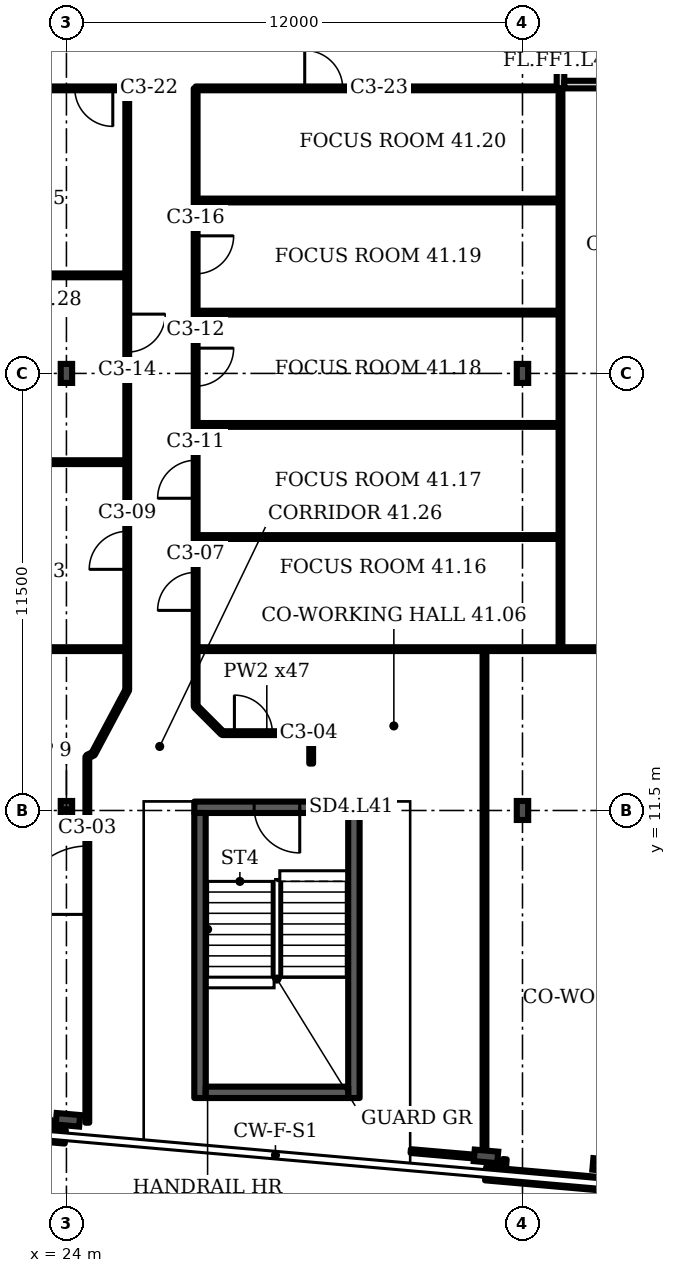
"""IFC4 building model, lengths in metres.
Left out: names, types, materials, properties, quantities, classifications, styles, units other than length and angle.
Written with IfcOpenShell. Run it as: python <this file> out.ifc"""

import sys

from ifc_helpers import new_model, si_unit, direction, frame, frame_2d, origin, origin_2d, place, context, subcontext, project, spatial, rectangle, i_section, extrude, element, fill, save


model = new_model("IFC4")
c1 = context("Model", 3, precision=1e-05, world=origin(), true_north=direction((0.0, 1.0)))
c2 = subcontext(c1, "Body", "Model", "MODEL_VIEW")
j1 = project(units=[si_unit("LENGTHUNIT", "METRE"), si_unit("PLANEANGLEUNIT", "RADIAN")], contexts=[c1])
p1 = place(None, origin())
s1 = spatial("IfcSite", under=j1, at=p1, CompositionType="ELEMENT")
p2 = place(p1, origin())
s2 = spatial("IfcBuilding", under=s1, at=p2, CompositionType="ELEMENT")
p3 = place(p2, frame((0.0, 0.0, 169.9)))
s3 = spatial("IfcBuildingStorey", under=s2, at=p3, CompositionType="ELEMENT", Elevation=169.9)
for number, where, z_axis, x_axis in (
    (1, (24.039, 3.361, 0.0), (0.0, 0.0, 1.0), (-0.087, -0.996, 0.0)),
    (2, (35.039, 2.399, 0.0), (0.0, 0.0, 1.0), (-0.087, -0.996, 0.0)),
    (3, (38.161, 2.174, 0.0), (0.0, 0.0, 1.0), (-0.087, -0.996, 0.0)),
):
    element("IfcColumn", number, at=place(p3, frame(where, z_axis=z_axis, x_axis=x_axis)), inside=s3, PredefinedType="COLUMN", context=c2, shape_type="SweptSolid", body=[
        extrude(i_section(OverallWidth=0.305, OverallDepth=0.62, WebThickness=0.021, FlangeThickness=0.04, FilletRadius=0.027, at=origin_2d()), origin(), (0.0, 0.0, 1.0), 3.6),
    ])
for number, where, z_axis, x_axis in (
    (4, (24.0, 11.5, 0.0), (0.0, 0.0, 1.0), (1.0, 0.0, 0.0)),
    (5, (36.0, 11.5, 0.0), (0.0, 0.0, 1.0), (1.0, 0.0, 0.0)),
    (6, (24.0, 23.0, 0.0), (0.0, 0.0, 1.0), (1.0, 0.0, 0.0)),
    (7, (36.0, 23.0, 0.0), (0.0, 0.0, 1.0), (1.0, 0.0, 0.0)),
):
    element("IfcColumn", number, at=place(p3, frame(where, z_axis=z_axis, x_axis=x_axis)), inside=s3, PredefinedType="COLUMN", context=c2, shape_type="SweptSolid", body=[
        extrude(i_section(OverallWidth=0.3, OverallDepth=0.5, WebThickness=0.014, FlangeThickness=0.028, FilletRadius=0.027, at=origin_2d()), origin(), (0.0, 0.0, 1.0), 3.6),
    ])
p4 = place(p3, frame((12.835, 3.885, 0.0), z_axis=(0.0, 0.0, 1.0), x_axis=(0.996199, -0.087154, 0.0)))
e8 = element("IfcWall", 8, at=p4, inside=s3, PredefinedType="SOLIDWALL", context=c2, shape_type="SweptSolid", body=[
    extrude(rectangle(XDim=11.177, YDim=0.35, at=frame_2d((5.588, 0.0))), origin(), (0.0, 0.0, 1.0), 1.0),
])
p5 = place(p3, frame((35.03, 1.943, 0.0), z_axis=(0.0, 0.0, 1.0), x_axis=(0.996199, -0.08714, 0.0)))
e9 = element("IfcWall", 9, at=p5, inside=s3, PredefinedType="SOLIDWALL", context=c2, shape_type="SweptSolid", body=[
    extrude(rectangle(XDim=11.028, YDim=0.35, at=frame_2d((5.514, 0.0))), origin(), (0.0, 0.0, 1.0), 1.0),
])
p6 = place(p3, frame((37.0, 30.5, 0.0), z_axis=(0.0, 0.0, 1.0), x_axis=(0.0, 1.0, 0.0)))
e10 = element("IfcWall", 10, at=p6, inside=s3, PredefinedType="PARTITIONING", context=c2, shape_type="SweptSolid", body=[
    extrude(rectangle(XDim=3.5, YDim=0.2, at=frame_2d((1.75, 0.0))), origin(), (0.0, 0.0, 1.0), 3.2),
])
p7 = place(p6, frame((1.2, 0.0, 0.0)))
e11 = element("IfcOpeningElement", 11, at=p7, cuts=e10, PredefinedType="OPENING", context=c2, shape_type="SweptSolid", body=[
    extrude(rectangle(XDim=1.1, YDim=2.1, at=frame_2d((0.55, 1.05))), frame((0.0, 0.11, 0.0), z_axis=(0.0, -1.0, 0.0), x_axis=(1.0, 0.0, 0.0)), (0.0, 0.0, 1.0), 0.22),
])
p8 = place(p3, frame((37.1, 30.6, 0.0), z_axis=(0.0, 0.0, 1.0), x_axis=(1.0, 0.0, 0.0)))
e12 = element("IfcWall", 12, at=p8, inside=s3, PredefinedType="PARTITIONING", context=c2, shape_type="SweptSolid", body=[
    extrude(rectangle(XDim=2.8, YDim=0.2, at=frame_2d((1.4, 0.0))), origin(), (0.0, 0.0, 1.0), 3.2),
])
p9 = place(p3, frame((27.364, 11.584, 0.0), z_axis=(0.0, 0.0, 1.0), x_axis=(1.0, 0.0, 0.0)))
e13 = element("IfcWall", 13, at=p9, inside=s3, PredefinedType="SHEAR", context=c2, shape_type="SweptSolid", body=[
    extrude(rectangle(XDim=4.35, YDim=0.3, at=frame_2d((2.175, 0.0))), origin(), (0.0, 0.0, 1.0), 3.2),
])
p10 = place(p9, frame((1.575, 0.0, 0.0)))
e14 = element("IfcOpeningElement", 14, at=p10, cuts=e13, PredefinedType="OPENING", context=c2, shape_type="SweptSolid", body=[
    extrude(rectangle(XDim=1.2, YDim=2.1, at=frame_2d((0.6, 1.05))), frame((0.0, 0.16, 0.0), z_axis=(0.0, -1.0, 0.0), x_axis=(1.0, 0.0, 0.0)), (0.0, 0.0, 1.0), 0.32),
])
p11 = place(p3, frame((13.0, 15.745, 0.0), z_axis=(0.0, 0.0, 1.0), x_axis=(1.0, 0.0, 0.0)))
e15 = element("IfcWall", 15, at=p11, inside=s3, PredefinedType="PARTITIONING", context=c2, shape_type="SweptSolid", body=[
    extrude(rectangle(XDim=12.6, YDim=0.1, at=frame_2d((6.3, 0.0))), origin(), (0.0, 0.0, 1.0), 3.2),
])
p12 = place(p3, frame((17.8, 30.5, 0.0), z_axis=(0.0, 0.0, 1.0), x_axis=(1.0, 0.0, 0.0)))
e16 = element("IfcWall", 16, at=p12, inside=s3, PredefinedType="PARTITIONING", context=c2, shape_type="SweptSolid", body=[
    extrude(rectangle(XDim=7.8, YDim=0.1, at=frame_2d((3.9, 0.0))), origin(), (0.0, 0.0, 1.0), 3.2),
])
p13 = place(p12, frame((6.42, 0.0, 0.0)))
e17 = element("IfcOpeningElement", 17, at=p13, cuts=e16, PredefinedType="OPENING", context=c2, shape_type="SweptSolid", body=[
    extrude(rectangle(XDim=1.0, YDim=2.1, at=frame_2d((0.5, 1.05))), frame((0.0, 0.06, 0.0), z_axis=(0.0, -1.0, 0.0), x_axis=(1.0, 0.0, 0.0)), (0.0, 0.0, 1.0), 0.12),
])
for number, where, z_axis, x_axis in (
    (18, (19.0, 20.665, 0.0), (0.0, 0.0, 1.0), (1.0, 0.0, 0.0)),
    (19, (19.0, 25.58, 0.0), (0.0, 0.0, 1.0), (1.0, 0.0, 0.0)),
):
    element("IfcWall", number, at=place(p3, frame(where, z_axis=z_axis, x_axis=x_axis)), inside=s3, PredefinedType="PARTITIONING", context=c2, shape_type="SweptSolid", body=[
        extrude(rectangle(XDim=6.6, YDim=0.1, at=frame_2d((3.3, 0.0))), origin(), (0.0, 0.0, 1.0), 3.2),
    ])
p14 = place(p3, frame((24.55, 12.915, 0.0), z_axis=(0.0, 0.0, 1.0), x_axis=(0.900306, 0.435266, 0.0)))
e20 = element("IfcWall", 20, at=p14, inside=s3, PredefinedType="PARTITIONING", context=c2, shape_type="SweptSolid", body=[
    extrude(rectangle(XDim=0.172, YDim=0.1, at=frame_2d((0.086, 0.0))), origin(), (0.0, 0.0, 1.0), 3.2),
])
p15 = place(p3, frame((24.55, 3.285, 0.0), z_axis=(0.0, 0.0, 1.0), x_axis=(0.0, 1.0, 0.0)))
e21 = element("IfcWall", 21, at=p15, inside=s3, PredefinedType="PARTITIONING", context=c2, shape_type="SweptSolid", body=[
    extrude(rectangle(XDim=9.63, YDim=0.1, at=frame_2d((4.815, 0.0))), origin(), (0.0, 0.0, 1.0), 3.2),
])
p16 = place(p15, frame((5.481, 0.0, 0.0)))
e22 = element("IfcOpeningElement", 22, at=p16, cuts=e21, PredefinedType="OPENING", context=c2, shape_type="SweptSolid", body=[
    extrude(rectangle(XDim=1.8, YDim=2.1, at=frame_2d((0.9, 1.05))), frame((0.0, 0.06, 0.0), z_axis=(0.0, -1.0, 0.0), x_axis=(1.0, 0.0, 0.0)), (0.0, 0.0, 1.0), 0.12),
])
p17 = place(p3, frame((24.705, 12.99, 0.0), z_axis=(0.0, 0.0, 1.0), x_axis=(0.4702, 0.882555, 0.0)))
e23 = element("IfcWall", 23, at=p17, inside=s3, PredefinedType="PARTITIONING", context=c2, shape_type="SweptSolid", body=[
    extrude(rectangle(XDim=1.904, YDim=0.1, at=frame_2d((0.952, 0.0))), origin(), (0.0, 0.0, 1.0), 3.2),
])
p18 = place(p3, frame((25.6, 14.67, 0.0), z_axis=(0.0, 0.0, 1.0), x_axis=(0.0, 1.0, 0.0)))
e24 = element("IfcWall", 24, at=p18, inside=s3, PredefinedType="PARTITIONING", context=c2, shape_type="SweptSolid", body=[
    extrude(rectangle(XDim=15.83, YDim=0.1, at=frame_2d((7.915, 0.0))), origin(), (0.0, 0.0, 1.0), 3.2),
])
p19 = place(p18, frame((3.175, 0.0, 0.0)))
e25 = element("IfcOpeningElement", 25, at=p19, cuts=e24, PredefinedType="OPENING", context=c2, shape_type="SweptSolid", body=[
    extrude(rectangle(XDim=1.0, YDim=2.1, at=frame_2d((0.5, 1.05))), frame((0.0, 0.06, 0.0), z_axis=(0.0, -1.0, 0.0), x_axis=(1.0, 0.0, 0.0)), (0.0, 0.0, 1.0), 0.12),
])
p20 = place(p18, frame((8.89, 0.0, 0.0)))
e26 = element("IfcOpeningElement", 26, at=p20, cuts=e24, PredefinedType="OPENING", context=c2, shape_type="SweptSolid", body=[
    extrude(rectangle(XDim=1.0, YDim=2.1, at=frame_2d((0.5, 1.05))), frame((0.0, 0.06, 0.0), z_axis=(0.0, -1.0, 0.0), x_axis=(1.0, 0.0, 0.0)), (0.0, 0.0, 1.0), 0.12),
])
p21 = place(p3, frame((27.4, 14.24, 0.0), z_axis=(0.0, 0.0, 1.0), x_axis=(0.0, 1.0, 0.0)))
e27 = element("IfcWall", 27, at=p21, inside=s3, PredefinedType="PARTITIONING", context=c2, shape_type="SweptSolid", body=[
    extrude(rectangle(XDim=16.26, YDim=0.1, at=frame_2d((8.13, 0.0))), origin(), (0.0, 0.0, 1.0), 3.2),
])
p22 = place(p21, frame((2.525, 0.0, 0.0)))
e28 = element("IfcOpeningElement", 28, at=p22, cuts=e27, PredefinedType="OPENING", context=c2, shape_type="SweptSolid", body=[
    extrude(rectangle(XDim=1.0, YDim=2.1, at=frame_2d((0.5, 1.05))), frame((0.0, 0.06, 0.0), z_axis=(0.0, -1.0, 0.0), x_axis=(1.0, 0.0, 0.0)), (0.0, 0.0, 1.0), 0.12),
])
p23 = place(p21, frame((5.475, 0.0, 0.0)))
e29 = element("IfcOpeningElement", 29, at=p23, cuts=e27, PredefinedType="OPENING", context=c2, shape_type="SweptSolid", body=[
    extrude(rectangle(XDim=1.0, YDim=2.1, at=frame_2d((0.5, 1.05))), frame((0.0, 0.06, 0.0), z_axis=(0.0, -1.0, 0.0), x_axis=(1.0, 0.0, 0.0)), (0.0, 0.0, 1.0), 0.12),
])
p24 = place(p21, frame((8.425, 0.0, 0.0)))
e30 = element("IfcOpeningElement", 30, at=p24, cuts=e27, PredefinedType="OPENING", context=c2, shape_type="SweptSolid", body=[
    extrude(rectangle(XDim=1.0, YDim=2.1, at=frame_2d((0.5, 1.05))), frame((0.0, 0.06, 0.0), z_axis=(0.0, -1.0, 0.0), x_axis=(1.0, 0.0, 0.0)), (0.0, 0.0, 1.0), 0.12),
])
p25 = place(p21, frame((11.38, 0.0, 0.0)))
e31 = element("IfcOpeningElement", 31, at=p25, cuts=e27, PredefinedType="OPENING", context=c2, shape_type="SweptSolid", body=[
    extrude(rectangle(XDim=1.0, YDim=2.1, at=frame_2d((0.5, 1.05))), frame((0.0, 0.06, 0.0), z_axis=(0.0, -1.0, 0.0), x_axis=(1.0, 0.0, 0.0)), (0.0, 0.0, 1.0), 0.12),
])
p26 = place(p3, frame((27.4, 15.745, 0.0), z_axis=(0.0, 0.0, 1.0), x_axis=(1.0, 0.0, 0.0)))
e32 = element("IfcWall", 32, at=p26, inside=s3, PredefinedType="PARTITIONING", context=c2, shape_type="SweptSolid", body=[
    extrude(rectangle(XDim=17.7, YDim=0.1, at=frame_2d((8.85, 0.0))), origin(), (0.0, 0.0, 1.0), 3.2),
])
for number, where, z_axis, x_axis in (
    (33, (27.4, 18.695, 0.0), (0.0, 0.0, 1.0), (1.0, 0.0, 0.0)),
    (34, (27.4, 21.645, 0.0), (0.0, 0.0, 1.0), (1.0, 0.0, 0.0)),
    (35, (27.4, 24.6, 0.0), (0.0, 0.0, 1.0), (1.0, 0.0, 0.0)),
    (36, (27.4, 27.55, 0.0), (0.0, 0.0, 1.0), (1.0, 0.0, 0.0)),
):
    element("IfcWall", number, at=place(p3, frame(where, z_axis=z_axis, x_axis=x_axis)), inside=s3, PredefinedType="PARTITIONING", context=c2, shape_type="SweptSolid", body=[
        extrude(rectangle(XDim=9.6, YDim=0.1, at=frame_2d((4.8, 0.0))), origin(), (0.0, 0.0, 1.0), 3.2),
    ])
p27 = place(p3, frame((27.4, 30.5, 0.0), z_axis=(0.0, 0.0, 1.0), x_axis=(1.0, 0.0, 0.0)))
e37 = element("IfcWall", 37, at=p27, inside=s3, PredefinedType="PARTITIONING", context=c2, shape_type="SweptSolid", body=[
    extrude(rectangle(XDim=9.45, YDim=0.1, at=frame_2d((4.725, 0.0))), origin(), (0.0, 0.0, 1.0), 3.2),
])
p28 = place(p27, frame((2.87, 0.0, 0.0)))
e38 = element("IfcOpeningElement", 38, at=p28, cuts=e37, PredefinedType="OPENING", context=c2, shape_type="SweptSolid", body=[
    extrude(rectangle(XDim=1.0, YDim=2.1, at=frame_2d((0.5, 1.05))), frame((0.0, 0.06, 0.0), z_axis=(0.0, -1.0, 0.0), x_axis=(1.0, 0.0, 0.0)), (0.0, 0.0, 1.0), 0.12),
])
p29 = place(p3, frame((28.105, 13.535, 0.0), z_axis=(0.0, 0.0, 1.0), x_axis=(-0.707107, 0.707107, 0.0)))
e39 = element("IfcWall", 39, at=p29, inside=s3, PredefinedType="PARTITIONING", context=c2, shape_type="SweptSolid", body=[
    extrude(rectangle(XDim=0.997, YDim=0.1, at=frame_2d((0.499, 0.0))), origin(), (0.0, 0.0, 1.0), 3.2),
])
p30 = place(p3, frame((28.105, 13.535, 0.0), z_axis=(0.0, 0.0, 1.0), x_axis=(1.0, 0.0, 0.0)))
e40 = element("IfcWall", 40, at=p30, inside=s3, PredefinedType="PARTITIONING", context=c2, shape_type="SweptSolid", body=[
    extrude(rectangle(XDim=2.335, YDim=0.1, at=frame_2d((1.167, 0.0))), origin(), (0.0, 0.0, 1.0), 3.2),
])
p31 = place(p30, frame((0.315, 0.0, 0.0)))
e41 = element("IfcOpeningElement", 41, at=p31, cuts=e40, PredefinedType="OPENING", context=c2, shape_type="SweptSolid", body=[
    extrude(rectangle(XDim=1.0, YDim=2.1, at=frame_2d((0.5, 1.05))), frame((0.0, 0.06, 0.0), z_axis=(0.0, -1.0, 0.0), x_axis=(1.0, 0.0, 0.0)), (0.0, 0.0, 1.0), 0.12),
])
p32 = place(p3, frame((30.44, 12.734, 0.0), z_axis=(0.0, 0.0, 1.0), x_axis=(0.0, 1.0, 0.0)))
e42 = element("IfcWall", 42, at=p32, inside=s3, PredefinedType="PARTITIONING", context=c2, shape_type="SweptSolid", body=[
    extrude(rectangle(XDim=0.801, YDim=0.1, at=frame_2d((0.4, 0.0))), origin(), (0.0, 0.0, 1.0), 3.2),
])
p33 = place(p3, frame((35.0, 2.37, 0.0), z_axis=(0.0, 0.0, 1.0), x_axis=(-0.996265, 0.086343, 0.0)))
e43 = element("IfcWall", 43, at=p33, inside=s3, PredefinedType="PARTITIONING", context=c2, shape_type="SweptSolid", body=[
    extrude(rectangle(XDim=1.948, YDim=0.1, at=frame_2d((0.974, 0.0))), origin(), (0.0, 0.0, 1.0), 2.58),
])
p34 = place(p3, frame((35.0, 2.37, 0.0), z_axis=(0.0, 0.0, 1.0), x_axis=(0.0, 1.0, 0.0)))
e44 = element("IfcWall", 44, at=p34, inside=s3, PredefinedType="PARTITIONING", context=c2, shape_type="SweptSolid", body=[
    extrude(rectangle(XDim=13.375, YDim=0.1, at=frame_2d((6.688, 0.0))), origin(), (0.0, 0.0, 1.0), 3.2),
])
p35 = place(p3, frame((35.502, 1.927, 0.0), z_axis=(0.0, 0.0, 1.0), x_axis=(0.083045, 0.996542, 0.0)))
e45 = element("IfcWall", 45, at=p35, inside=s3, PredefinedType="PARTITIONING", context=c2, shape_type="SweptSolid", body=[
    extrude(rectangle(XDim=0.4, YDim=0.1, at=frame_2d((0.2, 0.0))), origin(), (0.0, 0.0, 1.0), 3.2),
])
p36 = place(p3, frame((37.0, 15.745, 0.0), z_axis=(0.0, 0.0, 1.0), x_axis=(0.0, 1.0, 0.0)))
e46 = element("IfcWall", 46, at=p36, inside=s3, PredefinedType="PARTITIONING", context=c2, shape_type="SweptSolid", body=[
    extrude(rectangle(XDim=14.755, YDim=0.1, at=frame_2d((7.377, 0.0))), origin(), (0.0, 0.0, 1.0), 3.2),
])
for number, where, z_axis, x_axis in (
    (47, (27.514, 3.934, 0.0), (0.0, 0.0, 1.0), (0.0, 1.0, 0.0)),
    (48, (31.564, 3.934, 0.0), (0.0, 0.0, 1.0), (0.0, 1.0, 0.0)),
):
    element("IfcWall", number, at=place(p3, frame(where, z_axis=z_axis, x_axis=x_axis)), inside=s3, PredefinedType="SHEAR", context=c2, shape_type="SweptSolid", body=[
        extrude(rectangle(XDim=7.5, YDim=0.3, at=frame_2d((3.75, 0.0))), origin(), (0.0, 0.0, 1.0), 3.2),
    ])
p37 = place(p3, frame((27.664, 4.084, 0.0), z_axis=(0.0, 0.0, 1.0), x_axis=(1.0, 0.0, 0.0)))
e49 = element("IfcWall", 49, at=p37, inside=s3, PredefinedType="SHEAR", context=c2, shape_type="SweptSolid", body=[
    extrude(rectangle(XDim=3.75, YDim=0.3, at=frame_2d((1.875, 0.0))), origin(), (0.0, 0.0, 1.0), 3.2),
])
p38 = place(p10, origin())
e50 = element("IfcDoor", 50, at=p38, inside=s3, OperationType="SINGLE_SWING_RIGHT", PredefinedType="DOOR", context=c2, shape_type="SweptSolid", body=[
    extrude(rectangle(XDim=1.2, YDim=2.1, at=frame_2d((0.6, 1.05))), frame((0.0, 0.025, 0.0), z_axis=(0.0, -1.0, 0.0), x_axis=(1.0, 0.0, 0.0)), (0.0, 0.0, 1.0), 0.05),
])
fill(e14, e50)
p39 = place(p16, origin())
e51 = element("IfcDoor", 51, at=p39, inside=s3, OperationType="DOUBLE_DOOR_SINGLE_SWING", PredefinedType="DOOR", context=c2, shape_type="SweptSolid", body=[
    extrude(rectangle(XDim=1.8, YDim=2.1, at=frame_2d((0.9, 1.05))), frame((0.0, 0.025, 0.0), z_axis=(0.0, -1.0, 0.0), x_axis=(1.0, 0.0, 0.0)), (0.0, 0.0, 1.0), 0.05),
])
fill(e22, e51)
p40 = place(p31, origin())
e52 = element("IfcDoor", 52, at=p40, inside=s3, OperationType="SINGLE_SWING_LEFT", PredefinedType="DOOR", context=c2, shape_type="SweptSolid", body=[
    extrude(rectangle(XDim=1.0, YDim=2.1, at=frame_2d((0.5, 1.05))), frame((0.0, 0.025, 0.0), z_axis=(0.0, -1.0, 0.0), x_axis=(1.0, 0.0, 0.0)), (0.0, 0.0, 1.0), 0.05),
])
fill(e41, e52)
p41 = place(p22, origin())
e53 = element("IfcDoor", 53, at=p41, inside=s3, OperationType="SINGLE_SWING_LEFT", PredefinedType="DOOR", context=c2, shape_type="SweptSolid", body=[
    extrude(rectangle(XDim=1.0, YDim=2.1, at=frame_2d((0.5, 1.05))), frame((0.0, 0.025, 0.0), z_axis=(0.0, -1.0, 0.0), x_axis=(1.0, 0.0, 0.0)), (0.0, 0.0, 1.0), 0.05),
])
fill(e28, e53)
p42 = place(p19, origin())
e54 = element("IfcDoor", 54, at=p42, inside=s3, OperationType="SINGLE_SWING_LEFT", PredefinedType="DOOR", context=c2, shape_type="SweptSolid", body=[
    extrude(rectangle(XDim=1.0, YDim=2.1, at=frame_2d((0.5, 1.05))), frame((0.0, 0.025, 0.0), z_axis=(0.0, -1.0, 0.0), x_axis=(1.0, 0.0, 0.0)), (0.0, 0.0, 1.0), 0.05),
])
fill(e25, e54)
p43 = place(p23, origin())
e55 = element("IfcDoor", 55, at=p43, inside=s3, OperationType="SINGLE_SWING_LEFT", PredefinedType="DOOR", context=c2, shape_type="SweptSolid", body=[
    extrude(rectangle(XDim=1.0, YDim=2.1, at=frame_2d((0.5, 1.05))), frame((0.0, 0.025, 0.0), z_axis=(0.0, -1.0, 0.0), x_axis=(1.0, 0.0, 0.0)), (0.0, 0.0, 1.0), 0.05),
])
fill(e29, e55)
p44 = place(p24, origin())
e56 = element("IfcDoor", 56, at=p44, inside=s3, OperationType="SINGLE_SWING_RIGHT", PredefinedType="DOOR", context=c2, shape_type="SweptSolid", body=[
    extrude(rectangle(XDim=1.0, YDim=2.1, at=frame_2d((0.5, 1.05))), frame((0.0, 0.025, 0.0), z_axis=(0.0, -1.0, 0.0), x_axis=(1.0, 0.0, 0.0)), (0.0, 0.0, 1.0), 0.05),
])
fill(e30, e56)
p45 = place(p20, origin())
e57 = element("IfcDoor", 57, at=p45, inside=s3, OperationType="SINGLE_SWING_RIGHT", PredefinedType="DOOR", context=c2, shape_type="SweptSolid", body=[
    extrude(rectangle(XDim=1.0, YDim=2.1, at=frame_2d((0.5, 1.05))), frame((0.0, 0.025, 0.0), z_axis=(0.0, -1.0, 0.0), x_axis=(1.0, 0.0, 0.0)), (0.0, 0.0, 1.0), 0.05),
])
fill(e26, e57)
p46 = place(p25, origin())
e58 = element("IfcDoor", 58, at=p46, inside=s3, OperationType="SINGLE_SWING_RIGHT", PredefinedType="DOOR", context=c2, shape_type="SweptSolid", body=[
    extrude(rectangle(XDim=1.0, YDim=2.1, at=frame_2d((0.5, 1.05))), frame((0.0, 0.025, 0.0), z_axis=(0.0, -1.0, 0.0), x_axis=(1.0, 0.0, 0.0)), (0.0, 0.0, 1.0), 0.05),
])
fill(e31, e58)
p47 = place(p13, origin())
e59 = element("IfcDoor", 59, at=p47, inside=s3, OperationType="SINGLE_SWING_RIGHT", PredefinedType="DOOR", context=c2, shape_type="SweptSolid", body=[
    extrude(rectangle(XDim=1.0, YDim=2.1, at=frame_2d((0.5, 1.05))), frame((0.0, 0.025, 0.0), z_axis=(0.0, -1.0, 0.0), x_axis=(1.0, 0.0, 0.0)), (0.0, 0.0, 1.0), 0.05),
])
fill(e17, e59)
p48 = place(p28, origin())
e60 = element("IfcDoor", 60, at=p48, inside=s3, OperationType="SINGLE_SWING_LEFT", PredefinedType="DOOR", context=c2, shape_type="SweptSolid", body=[
    extrude(rectangle(XDim=1.0, YDim=2.1, at=frame_2d((0.5, 1.05))), frame((0.0, 0.025, 0.0), z_axis=(0.0, -1.0, 0.0), x_axis=(1.0, 0.0, 0.0)), (0.0, 0.0, 1.0), 0.05),
])
fill(e38, e60)
save(model, sys.argv[1])
